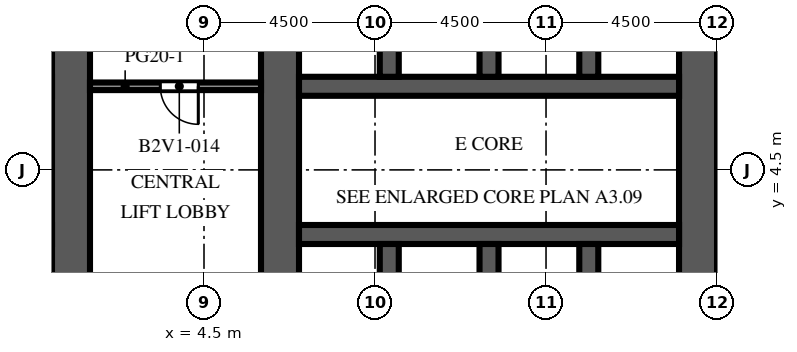
"""IFC4 building model, lengths in metres.
Left out: names, types, materials, properties, quantities, classifications, styles, units other than length and angle.
Written with IfcOpenShell. Run it as: python <this file> out.ifc"""

import sys

from ifc_helpers import new_model, si_unit, direction, frame, frame_2d, origin, place, context, subcontext, project, spatial, rectangle, extrude, element, fill, save


model = new_model("IFC4")
c1 = context("Model", 3, precision=1e-05, world=origin(), true_north=direction((0.0, 1.0)))
c2 = subcontext(c1, "Body", "Model", "MODEL_VIEW")
j1 = project(units=[si_unit("LENGTHUNIT", "METRE"), si_unit("PLANEANGLEUNIT", "RADIAN")], contexts=[c1])
p1 = place(None, origin())
s1 = spatial("IfcSite", under=j1, at=p1, CompositionType="ELEMENT")
p2 = place(p1, origin())
s2 = spatial("IfcBuilding", under=s1, at=p2, CompositionType="ELEMENT")
p3 = place(p2, frame((0.0, 0.0, 46.0)))
s3 = spatial("IfcBuildingStorey", under=s2, at=p3, CompositionType="ELEMENT", Elevation=46.0)
p4 = place(p3, frame((1.0, -9.0, 0.0), z_axis=(0.0, 0.0, 1.0), x_axis=(0.0, 1.0, 0.0)))
e1 = element("IfcWall", 1, at=p4, inside=s3, PredefinedType="SHEAR", context=c2, shape_type="SweptSolid", body=[
    extrude(rectangle(XDim=27.5, YDim=1.0, at=frame_2d((13.75, 0.0))), origin(), (0.0, 0.0, 1.0), 4.1),
])
p5 = place(p4, frame((12.55, 0.0, 0.0)))
e2 = element("IfcOpeningElement", 2, at=p5, cuts=e1, PredefinedType="OPENING", context=c2, shape_type="SweptSolid", body=[
    extrude(rectangle(XDim=2.4, YDim=2.4, at=frame_2d((1.2, 1.2))), frame((0.0, 0.51, 0.0), z_axis=(0.0, -1.0, 0.0), x_axis=(1.0, 0.0, 0.0)), (0.0, 0.0, 1.0), 1.02),
])
p6 = place(p4, frame((4.025, 0.0, 0.0)))
e3 = element("IfcOpeningElement", 3, at=p6, cuts=e1, PredefinedType="OPENING", context=c2, shape_type="SweptSolid", body=[
    extrude(rectangle(XDim=1.2, YDim=2.1, at=frame_2d((0.6, 1.05))), frame((0.0, 0.51, 0.0), z_axis=(0.0, -1.0, 0.0), x_axis=(1.0, 0.0, 0.0)), (0.0, 0.0, 1.0), 1.02),
])
p7 = place(p4, frame((22.275, 0.0, 0.0)))
e4 = element("IfcOpeningElement", 4, at=p7, cuts=e1, PredefinedType="OPENING", context=c2, shape_type="SweptSolid", body=[
    extrude(rectangle(XDim=1.2, YDim=2.1, at=frame_2d((0.6, 1.05))), frame((0.0, 0.51, 0.0), z_axis=(0.0, -1.0, 0.0), x_axis=(1.0, 0.0, 0.0)), (0.0, 0.0, 1.0), 1.02),
])
p8 = place(p3, frame((6.5, -9.0, 0.0), z_axis=(0.0, 0.0, 1.0), x_axis=(0.0, 1.0, 0.0)))
e5 = element("IfcWall", 5, at=p8, inside=s3, PredefinedType="SHEAR", context=c2, shape_type="SweptSolid", body=[
    extrude(rectangle(XDim=27.5, YDim=1.0, at=frame_2d((13.75, 0.0))), origin(), (0.0, 0.0, 1.0), 4.1),
])
p9 = place(p8, frame((12.55, 0.0, 0.0)))
e6 = element("IfcOpeningElement", 6, at=p9, cuts=e5, PredefinedType="OPENING", context=c2, shape_type="SweptSolid", body=[
    extrude(rectangle(XDim=2.4, YDim=2.4, at=frame_2d((1.2, 1.2))), frame((0.0, 0.51, 0.0), z_axis=(0.0, -1.0, 0.0), x_axis=(1.0, 0.0, 0.0)), (0.0, 0.0, 1.0), 1.02),
])
p10 = place(p8, frame((4.025, 0.0, 0.0)))
e7 = element("IfcOpeningElement", 7, at=p10, cuts=e5, PredefinedType="OPENING", context=c2, shape_type="SweptSolid", body=[
    extrude(rectangle(XDim=1.2, YDim=2.1, at=frame_2d((0.6, 1.05))), frame((0.0, 0.51, 0.0), z_axis=(0.0, -1.0, 0.0), x_axis=(1.0, 0.0, 0.0)), (0.0, 0.0, 1.0), 1.02),
])
p11 = place(p8, frame((22.275, 0.0, 0.0)))
e8 = element("IfcOpeningElement", 8, at=p11, cuts=e5, PredefinedType="OPENING", context=c2, shape_type="SweptSolid", body=[
    extrude(rectangle(XDim=1.2, YDim=2.1, at=frame_2d((0.6, 1.05))), frame((0.0, 0.51, 0.0), z_axis=(0.0, -1.0, 0.0), x_axis=(1.0, 0.0, 0.0)), (0.0, 0.0, 1.0), 1.02),
])
p12 = place(p3, frame((17.5, -9.0, 0.0), z_axis=(0.0, 0.0, 1.0), x_axis=(0.0, 1.0, 0.0)))
e9 = element("IfcWall", 9, at=p12, inside=s3, PredefinedType="SHEAR", context=c2, shape_type="SweptSolid", body=[
    extrude(rectangle(XDim=27.5, YDim=1.0, at=frame_2d((13.75, 0.0))), origin(), (0.0, 0.0, 1.0), 4.1),
])
p13 = place(p12, frame((12.55, 0.0, 0.0)))
e10 = element("IfcOpeningElement", 10, at=p13, cuts=e9, PredefinedType="OPENING", context=c2, shape_type="SweptSolid", body=[
    extrude(rectangle(XDim=2.4, YDim=2.4, at=frame_2d((1.2, 1.2))), frame((0.0, 0.51, 0.0), z_axis=(0.0, -1.0, 0.0), x_axis=(1.0, 0.0, 0.0)), (0.0, 0.0, 1.0), 1.02),
])
p14 = place(p12, frame((6.825, 0.0, 0.0)))
e11 = element("IfcOpeningElement", 11, at=p14, cuts=e9, PredefinedType="OPENING", context=c2, shape_type="SweptSolid", body=[
    extrude(rectangle(XDim=1.2, YDim=2.1, at=frame_2d((0.6, 1.05))), frame((0.0, 0.51, 0.0), z_axis=(0.0, -1.0, 0.0), x_axis=(1.0, 0.0, 0.0)), (0.0, 0.0, 1.0), 1.02),
])
p15 = place(p12, frame((19.475, 0.0, 0.0)))
e12 = element("IfcOpeningElement", 12, at=p15, cuts=e9, PredefinedType="OPENING", context=c2, shape_type="SweptSolid", body=[
    extrude(rectangle(XDim=1.2, YDim=2.1, at=frame_2d((0.6, 1.05))), frame((0.0, 0.51, 0.0), z_axis=(0.0, -1.0, 0.0), x_axis=(1.0, 0.0, 0.0)), (0.0, 0.0, 1.0), 1.02),
])
p16 = place(p3, frame((7.0, 2.8, 0.0), z_axis=(0.0, 0.0, 1.0), x_axis=(1.0, 0.0, 0.0)))
e13 = element("IfcWall", 13, at=p16, inside=s3, PredefinedType="SHEAR", context=c2, shape_type="SweptSolid", body=[
    extrude(rectangle(XDim=10.0, YDim=0.5, at=frame_2d((5.0, 0.0))), origin(), (0.0, 0.0, 1.0), 4.1),
])
p17 = place(p16, frame((0.512, 0.0, 0.0)))
e14 = element("IfcOpeningElement", 14, at=p17, cuts=e13, PredefinedType="OPENING", context=c2, shape_type="SweptSolid", body=[
    extrude(rectangle(XDim=1.1, YDim=2.1, at=frame_2d((0.55, 1.05))), frame((0.0, 0.26, 0.0), z_axis=(0.0, -1.0, 0.0), x_axis=(1.0, 0.0, 0.0)), (0.0, 0.0, 1.0), 0.52),
])
p18 = place(p16, frame((3.137, 0.0, 0.0)))
e15 = element("IfcOpeningElement", 15, at=p18, cuts=e13, PredefinedType="OPENING", context=c2, shape_type="SweptSolid", body=[
    extrude(rectangle(XDim=1.1, YDim=2.1, at=frame_2d((0.55, 1.05))), frame((0.0, 0.26, 0.0), z_axis=(0.0, -1.0, 0.0), x_axis=(1.0, 0.0, 0.0)), (0.0, 0.0, 1.0), 0.52),
])
p19 = place(p16, frame((8.387, 0.0, 0.0)))
e16 = element("IfcOpeningElement", 16, at=p19, cuts=e13, PredefinedType="OPENING", context=c2, shape_type="SweptSolid", body=[
    extrude(rectangle(XDim=1.1, YDim=2.1, at=frame_2d((0.55, 1.05))), frame((0.0, 0.26, 0.0), z_axis=(0.0, -1.0, 0.0), x_axis=(1.0, 0.0, 0.0)), (0.0, 0.0, 1.0), 0.52),
])
p20 = place(p3, frame((7.0, 6.7, 0.0), z_axis=(0.0, 0.0, 1.0), x_axis=(1.0, 0.0, 0.0)))
e17 = element("IfcWall", 17, at=p20, inside=s3, PredefinedType="SHEAR", context=c2, shape_type="SweptSolid", body=[
    extrude(rectangle(XDim=10.0, YDim=0.5, at=frame_2d((5.0, 0.0))), origin(), (0.0, 0.0, 1.0), 4.1),
])
p21 = place(p20, frame((0.512, 0.0, 0.0)))
e18 = element("IfcOpeningElement", 18, at=p21, cuts=e17, PredefinedType="OPENING", context=c2, shape_type="SweptSolid", body=[
    extrude(rectangle(XDim=1.1, YDim=2.1, at=frame_2d((0.55, 1.05))), frame((0.0, 0.26, 0.0), z_axis=(0.0, -1.0, 0.0), x_axis=(1.0, 0.0, 0.0)), (0.0, 0.0, 1.0), 0.52),
])
p22 = place(p20, frame((3.188, 0.0, 0.0)))
e19 = element("IfcOpeningElement", 19, at=p22, cuts=e17, PredefinedType="OPENING", context=c2, shape_type="SweptSolid", body=[
    extrude(rectangle(XDim=1.0, YDim=2.1, at=frame_2d((0.5, 1.05))), frame((0.0, 0.26, 0.0), z_axis=(0.0, -1.0, 0.0), x_axis=(1.0, 0.0, 0.0)), (0.0, 0.0, 1.0), 0.52),
])
p23 = place(p20, frame((5.812, 0.0, 0.0)))
e20 = element("IfcOpeningElement", 20, at=p23, cuts=e17, PredefinedType="OPENING", context=c2, shape_type="SweptSolid", body=[
    extrude(rectangle(XDim=1.0, YDim=2.1, at=frame_2d((0.5, 1.05))), frame((0.0, 0.26, 0.0), z_axis=(0.0, -1.0, 0.0), x_axis=(1.0, 0.0, 0.0)), (0.0, 0.0, 1.0), 0.52),
])
p24 = place(p20, frame((8.438, 0.0, 0.0)))
e21 = element("IfcOpeningElement", 21, at=p24, cuts=e17, PredefinedType="OPENING", context=c2, shape_type="SweptSolid", body=[
    extrude(rectangle(XDim=1.0, YDim=2.1, at=frame_2d((0.5, 1.05))), frame((0.0, 0.26, 0.0), z_axis=(0.0, -1.0, 0.0), x_axis=(1.0, 0.0, 0.0)), (0.0, 0.0, 1.0), 0.52),
])
for number, where, z_axis, x_axis in (
    (22, (9.375, -0.25, 0.0), (0.0, 0.0, 1.0), (0.0, 1.0, 0.0)),
    (23, (9.375, 6.95, 0.0), (0.0, 0.0, 1.0), (0.0, 1.0, 0.0)),
    (24, (12.0, -0.25, 0.0), (0.0, 0.0, 1.0), (0.0, 1.0, 0.0)),
    (25, (12.0, 6.95, 0.0), (0.0, 0.0, 1.0), (0.0, 1.0, 0.0)),
    (26, (14.625, -0.25, 0.0), (0.0, 0.0, 1.0), (0.0, 1.0, 0.0)),
    (27, (14.625, 6.95, 0.0), (0.0, 0.0, 1.0), (0.0, 1.0, 0.0)),
):
    element("IfcWall", number, at=place(p3, frame(where, z_axis=z_axis, x_axis=x_axis)), inside=s3, PredefinedType="SHEAR", context=c2, shape_type="SweptSolid", body=[
        extrude(rectangle(XDim=2.8, YDim=0.5, at=frame_2d((1.4, 0.0))), origin(), (0.0, 0.0, 1.0), 4.1),
    ])
p25 = place(p3, frame((1.5, 6.7, 0.0), z_axis=(0.0, 0.0, 1.0), x_axis=(1.0, 0.0, 0.0)))
e28 = element("IfcWall", 28, at=p25, inside=s3, PredefinedType="PARTITIONING", context=c2, shape_type="SweptSolid", body=[
    extrude(rectangle(XDim=4.5, YDim=0.2, at=frame_2d((2.25, 0.0))), origin(), (0.0, 0.0, 1.0), 3.65),
])
p26 = place(p25, frame((1.85, 0.0, 0.0)))
e29 = element("IfcOpeningElement", 29, at=p26, cuts=e28, PredefinedType="OPENING", context=c2, shape_type="SweptSolid", body=[
    extrude(rectangle(XDim=1.0, YDim=2.1, at=frame_2d((0.5, 1.05))), frame((0.0, 0.11, 0.0), z_axis=(0.0, -1.0, 0.0), x_axis=(1.0, 0.0, 0.0)), (0.0, 0.0, 1.0), 0.22),
])
p27 = place(p17, origin())
e30 = element("IfcDoor", 30, at=p27, inside=s3, OperationType="DOUBLE_DOOR_SLIDING", PredefinedType="DOOR", context=c2, shape_type="SweptSolid", body=[
    extrude(rectangle(XDim=1.1, YDim=2.1, at=frame_2d((0.55, 1.05))), frame((0.0, 0.025, 0.0), z_axis=(0.0, -1.0, 0.0), x_axis=(1.0, 0.0, 0.0)), (0.0, 0.0, 1.0), 0.05),
])
fill(e14, e30)
p28 = place(p18, origin())
e31 = element("IfcDoor", 31, at=p28, inside=s3, OperationType="DOUBLE_DOOR_SLIDING", PredefinedType="DOOR", context=c2, shape_type="SweptSolid", body=[
    extrude(rectangle(XDim=1.1, YDim=2.1, at=frame_2d((0.55, 1.05))), frame((0.0, 0.025, 0.0), z_axis=(0.0, -1.0, 0.0), x_axis=(1.0, 0.0, 0.0)), (0.0, 0.0, 1.0), 0.05),
])
fill(e15, e31)
p29 = place(p19, origin())
e32 = element("IfcDoor", 32, at=p29, inside=s3, OperationType="DOUBLE_DOOR_SLIDING", PredefinedType="DOOR", context=c2, shape_type="SweptSolid", body=[
    extrude(rectangle(XDim=1.1, YDim=2.1, at=frame_2d((0.55, 1.05))), frame((0.0, 0.025, 0.0), z_axis=(0.0, -1.0, 0.0), x_axis=(1.0, 0.0, 0.0)), (0.0, 0.0, 1.0), 0.05),
])
fill(e16, e32)
p30 = place(p21, origin())
e33 = element("IfcDoor", 33, at=p30, inside=s3, OperationType="DOUBLE_DOOR_SLIDING", PredefinedType="DOOR", context=c2, shape_type="SweptSolid", body=[
    extrude(rectangle(XDim=1.1, YDim=2.1, at=frame_2d((0.55, 1.05))), frame((0.0, 0.025, 0.0), z_axis=(0.0, -1.0, 0.0), x_axis=(1.0, 0.0, 0.0)), (0.0, 0.0, 1.0), 0.05),
])
fill(e18, e33)
p31 = place(p5, origin())
e34 = element("IfcDoor", 34, at=p31, inside=s3, OperationType="DOUBLE_DOOR_DOUBLE_SWING", PredefinedType="DOOR", context=c2, shape_type="SweptSolid", body=[
    extrude(rectangle(XDim=2.4, YDim=2.4, at=frame_2d((1.2, 1.2))), frame((0.0, 0.025, 0.0), z_axis=(0.0, -1.0, 0.0), x_axis=(1.0, 0.0, 0.0)), (0.0, 0.0, 1.0), 0.05),
])
fill(e2, e34)
p32 = place(p9, origin())
e35 = element("IfcDoor", 35, at=p32, inside=s3, OperationType="DOUBLE_DOOR_DOUBLE_SWING", PredefinedType="DOOR", context=c2, shape_type="SweptSolid", body=[
    extrude(rectangle(XDim=2.4, YDim=2.4, at=frame_2d((1.2, 1.2))), frame((0.0, 0.025, 0.0), z_axis=(0.0, -1.0, 0.0), x_axis=(1.0, 0.0, 0.0)), (0.0, 0.0, 1.0), 0.05),
])
fill(e6, e35)
p33 = place(p13, origin())
e36 = element("IfcDoor", 36, at=p33, inside=s3, OperationType="DOUBLE_DOOR_DOUBLE_SWING", PredefinedType="DOOR", context=c2, shape_type="SweptSolid", body=[
    extrude(rectangle(XDim=2.4, YDim=2.4, at=frame_2d((1.2, 1.2))), frame((0.0, 0.025, 0.0), z_axis=(0.0, -1.0, 0.0), x_axis=(1.0, 0.0, 0.0)), (0.0, 0.0, 1.0), 0.05),
])
fill(e10, e36)
p34 = place(p22, origin())
e37 = element("IfcDoor", 37, at=p34, inside=s3, OperationType="SINGLE_SWING_RIGHT", PredefinedType="DOOR", context=c2, shape_type="SweptSolid", body=[
    extrude(rectangle(XDim=1.0, YDim=2.1, at=frame_2d((0.5, 1.05))), frame((0.0, 0.025, 0.0), z_axis=(0.0, -1.0, 0.0), x_axis=(1.0, 0.0, 0.0)), (0.0, 0.0, 1.0), 0.05),
])
fill(e19, e37)
p35 = place(p23, origin())
e38 = element("IfcDoor", 38, at=p35, inside=s3, OperationType="SINGLE_SWING_LEFT", PredefinedType="DOOR", context=c2, shape_type="SweptSolid", body=[
    extrude(rectangle(XDim=1.0, YDim=2.1, at=frame_2d((0.5, 1.05))), frame((0.0, 0.025, 0.0), z_axis=(0.0, -1.0, 0.0), x_axis=(1.0, 0.0, 0.0)), (0.0, 0.0, 1.0), 0.05),
])
fill(e20, e38)
p36 = place(p24, origin())
e39 = element("IfcDoor", 39, at=p36, inside=s3, OperationType="SINGLE_SWING_RIGHT", PredefinedType="DOOR", context=c2, shape_type="SweptSolid", body=[
    extrude(rectangle(XDim=1.0, YDim=2.1, at=frame_2d((0.5, 1.05))), frame((0.0, 0.025, 0.0), z_axis=(0.0, -1.0, 0.0), x_axis=(1.0, 0.0, 0.0)), (0.0, 0.0, 1.0), 0.05),
])
fill(e21, e39)
p37 = place(p26, origin())
e40 = element("IfcDoor", 40, at=p37, inside=s3, OperationType="SINGLE_SWING_RIGHT", PredefinedType="DOOR", context=c2, shape_type="SweptSolid", body=[
    extrude(rectangle(XDim=1.0, YDim=2.1, at=frame_2d((0.5, 1.05))), frame((0.0, 0.025, 0.0), z_axis=(0.0, -1.0, 0.0), x_axis=(1.0, 0.0, 0.0)), (0.0, 0.0, 1.0), 0.05),
])
fill(e29, e40)
save(model, sys.argv[1])
